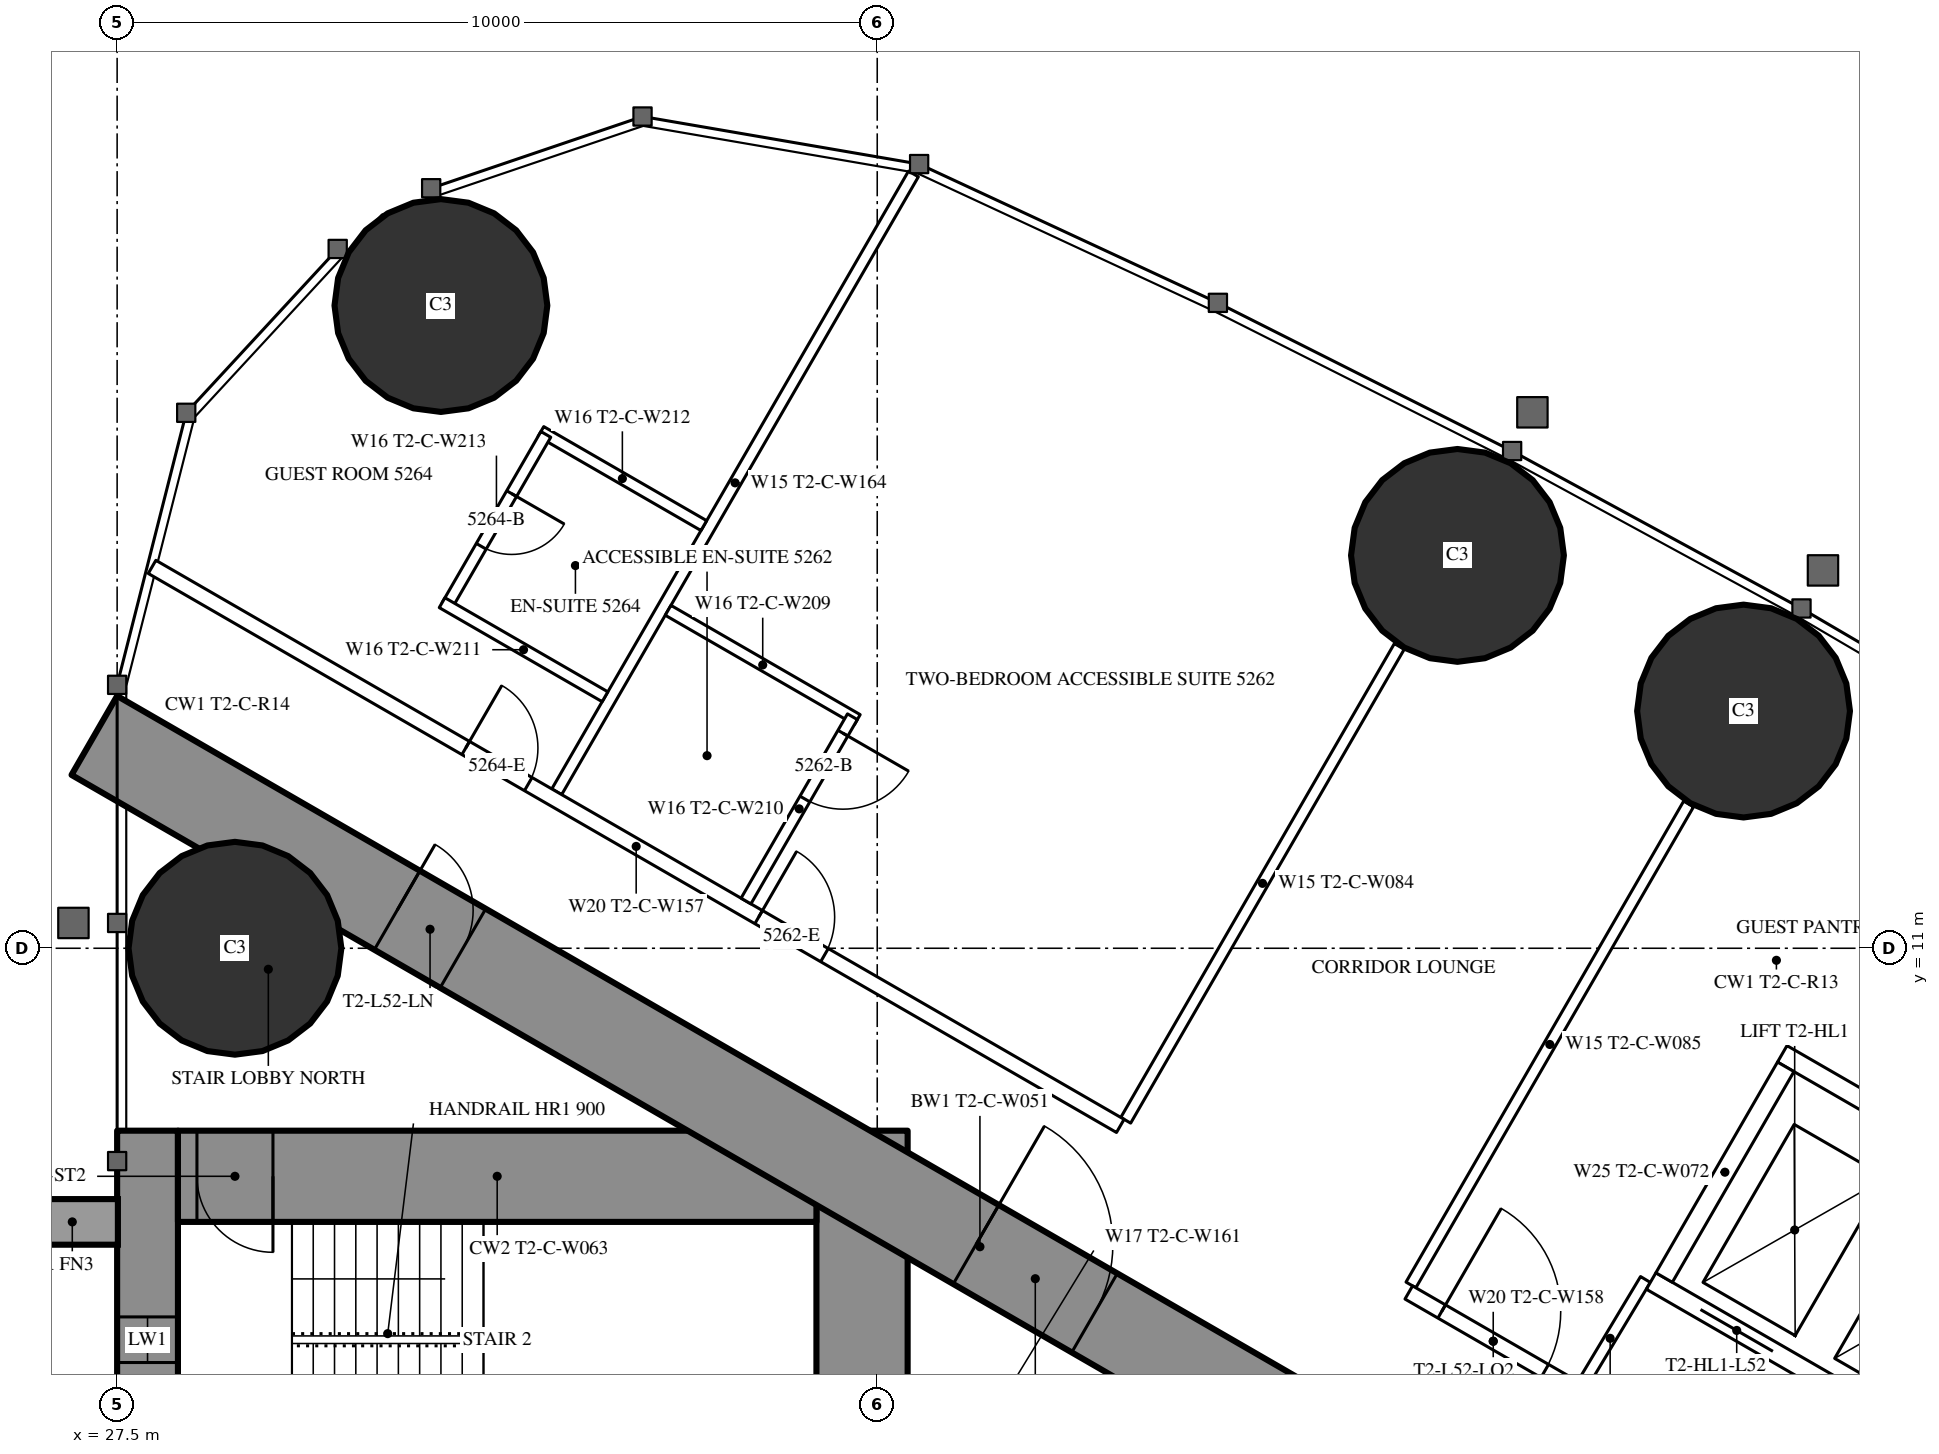
"""IFC4 building model, lengths in metres.
Left out: names, types, materials, properties, quantities, classifications, styles, units other than length and angle.
Written with IfcOpenShell. Run it as: python <this file> out.ifc"""

import sys

from ifc_helpers import new_model, si_unit, direction, frame, frame_2d, origin, origin_2d, place, context, subcontext, project, spatial, rectangle, circle, extrude, element, fill, save


model = new_model("IFC4")
c1 = context("Model", 3, precision=1e-05, world=origin(), true_north=direction((0.0, 1.0)))
c2 = subcontext(c1, "Body", "Model", "MODEL_VIEW")
j1 = project(units=[si_unit("LENGTHUNIT", "METRE"), si_unit("PLANEANGLEUNIT", "RADIAN")], contexts=[c1])
p1 = place(None, origin())
s1 = spatial("IfcSite", under=j1, at=p1, CompositionType="ELEMENT")
p2 = place(p1, origin())
s2 = spatial("IfcBuilding", under=s1, at=p2, CompositionType="ELEMENT")
p3 = place(p2, frame((0.0, 0.0, 194.8)))
s3 = spatial("IfcBuildingStorey", under=s2, at=p3, CompositionType="ELEMENT", Elevation=194.8)
for number, where, z_axis, x_axis in (
    (1, (31.76, 19.456, 0.0), (0.0, 0.0, 1.0), (1.0, 0.0, 0.0)),
    (2, (29.05, 11.0, 0.0), (0.0, 0.0, 1.0), (1.0, 0.0, 0.0)),
    (3, (48.897, 14.121, 0.0), (0.0, 0.0, 1.0), (1.0, 0.0, 0.0)),
    (4, (45.134, 16.168, 0.0), (0.0, 0.0, 1.0), (1.0, 0.0, 0.0)),
):
    element("IfcColumn", number, at=place(p3, frame(where, z_axis=z_axis, x_axis=x_axis)), inside=s3, PredefinedType="COLUMN", context=c2, shape_type="SweptSolid", body=[
        extrude(circle(Radius=1.4, at=origin_2d()), origin(), (0.0, 0.0, 1.0), 3.5),
    ])
p4 = place(p3, frame((27.9, -8.6, 0.0), z_axis=(0.0, 0.0, 1.0), x_axis=(0.0, 1.0, 0.0)))
e5 = element("IfcWall", 5, at=p4, inside=s3, PredefinedType="SHEAR", context=c2, shape_type="SweptSolid", body=[
    extrude(rectangle(XDim=17.2, YDim=0.8, at=frame_2d((8.6, 0.0))), origin(), (0.0, 0.0, 1.0), 3.5),
])
p5 = place(p4, frame((2.45, 0.0, 0.6)))
e6 = element("IfcOpeningElement", 6, at=p5, cuts=e5, PredefinedType="OPENING", context=c2, shape_type="SweptSolid", body=[
    extrude(rectangle(XDim=0.6, YDim=2.1, at=frame_2d((0.3, 1.05))), frame((0.0, 0.41, 0.0), z_axis=(0.0, -1.0, 0.0), x_axis=(1.0, 0.0, 0.0)), (0.0, 0.0, 1.0), 0.82),
])
p6 = place(p4, frame((14.15, 0.0, 0.6)))
e7 = element("IfcOpeningElement", 7, at=p6, cuts=e5, PredefinedType="OPENING", context=c2, shape_type="SweptSolid", body=[
    extrude(rectangle(XDim=0.6, YDim=2.1, at=frame_2d((0.3, 1.05))), frame((0.0, 0.41, 0.0), z_axis=(0.0, -1.0, 0.0), x_axis=(1.0, 0.0, 0.0)), (0.0, 0.0, 1.0), 0.82),
])
p7 = place(p3, frame((37.3, -8.6, 0.0), z_axis=(0.0, 0.0, 1.0), x_axis=(0.0, 1.0, 0.0)))
e8 = element("IfcWall", 8, at=p7, inside=s3, PredefinedType="SHEAR", context=c2, shape_type="SweptSolid", body=[
    extrude(rectangle(XDim=17.2, YDim=1.2, at=frame_2d((8.6, 0.0))), origin(), (0.0, 0.0, 1.0), 3.5),
])
p8 = place(p7, frame((7.7, 0.0, 0.0)))
e9 = element("IfcOpeningElement", 9, at=p8, cuts=e8, PredefinedType="OPENING", context=c2, shape_type="SweptSolid", body=[
    extrude(rectangle(XDim=1.8, YDim=2.2, at=frame_2d((0.9, 1.1))), frame((0.0, 0.61, 0.0), z_axis=(0.0, -1.0, 0.0), x_axis=(1.0, 0.0, 0.0)), (0.0, 0.0, 1.0), 1.22),
])
p9 = place(p3, frame((28.3, 8.0, 0.0), z_axis=(0.0, 0.0, 1.0), x_axis=(1.0, 0.0, 0.0)))
e10 = element("IfcWall", 10, at=p9, inside=s3, PredefinedType="SHEAR", context=c2, shape_type="SweptSolid", body=[
    extrude(rectangle(XDim=8.4, YDim=1.2, at=frame_2d((4.2, 0.0))), origin(), (0.0, 0.0, 1.0), 3.5),
])
p10 = place(p9, frame((0.25, 0.0, 0.0)))
e11 = element("IfcOpeningElement", 11, at=p10, cuts=e10, PredefinedType="OPENING", context=c2, shape_type="SweptSolid", body=[
    extrude(rectangle(XDim=1.0, YDim=2.2, at=frame_2d((0.5, 1.1))), frame((0.0, 0.61, 0.0), z_axis=(0.0, -1.0, 0.0), x_axis=(1.0, 0.0, 0.0)), (0.0, 0.0, 1.0), 1.22),
])
p11 = place(p3, frame((27.2, 13.8, 0.0), z_axis=(0.0, 0.0, 1.0), x_axis=(0.866024515034, -0.500001539357, 0.0)))
e12 = element("IfcWall", 12, at=p11, inside=s3, PredefinedType="SHEAR", context=c2, shape_type="SweptSolid", body=[
    extrude(rectangle(XDim=26.907, YDim=1.2, at=frame_2d((13.454, 0.0))), origin(), (0.0, 0.0, 1.0), 3.5),
])
p12 = place(p11, frame((4.6, 0.0, 0.0)))
e13 = element("IfcOpeningElement", 13, at=p12, cuts=e12, PredefinedType="OPENING", context=c2, shape_type="SweptSolid", body=[
    extrude(rectangle(XDim=1.0, YDim=2.2, at=frame_2d((0.5, 1.1))), frame((0.0, 0.61, 0.0), z_axis=(0.0, -1.0, 0.0), x_axis=(1.0, 0.0, 0.0)), (0.0, 0.0, 1.0), 1.22),
])
p13 = place(p11, frame((13.395, 0.0, 0.0)))
e14 = element("IfcOpeningElement", 14, at=p13, cuts=e12, PredefinedType="OPENING", context=c2, shape_type="SweptSolid", body=[
    extrude(rectangle(XDim=1.8, YDim=2.2, at=frame_2d((0.9, 1.1))), frame((0.0, 0.61, 0.0), z_axis=(0.0, -1.0, 0.0), x_axis=(1.0, 0.0, 0.0)), (0.0, 0.0, 1.0), 1.22),
])
p14 = place(p3, frame((33.284, 13.059, 0.0), z_axis=(0.0, 0.0, 1.0), x_axis=(0.499985904184, 0.866033541855, 0.0)))
e15 = element("IfcWall", 15, at=p14, inside=s3, PredefinedType="PARTITIONING", context=c2, shape_type="SweptSolid", body=[
    extrude(rectangle(XDim=9.385, YDim=0.15, at=frame_2d((4.693, 0.0))), origin(), (0.0, 0.0, 1.0), 3.25),
])
p15 = place(p3, frame((40.769, 8.737, 0.0), z_axis=(0.0, 0.0, 1.0), x_axis=(0.500013115284, 0.866017831539, 0.0)))
e16 = element("IfcWall", 16, at=p15, inside=s3, PredefinedType="PARTITIONING", context=c2, shape_type="SweptSolid", body=[
    extrude(rectangle(XDim=7.198, YDim=0.15, at=frame_2d((3.599, 0.0))), origin(), (0.0, 0.0, 1.0), 2.3),
])
p16 = place(p3, frame((44.521, 6.571, 0.0), z_axis=(0.0, 0.0, 1.0), x_axis=(0.500020376429, 0.866013639128, 0.0)))
e17 = element("IfcWall", 17, at=p16, inside=s3, PredefinedType="PARTITIONING", context=c2, shape_type="SweptSolid", body=[
    extrude(rectangle(XDim=7.306, YDim=0.15, at=frame_2d((3.653, 0.0))), origin(), (0.0, 0.0, 1.0), 2.3),
])
p17 = place(p3, frame((47.606, 6.643, 0.0), z_axis=(0.0, 0.0, 1.0), x_axis=(-0.514237157483, -0.857648031458, 0.0)))
e18 = element("IfcWall", 18, at=p17, inside=s3, PredefinedType="PARTITIONING", context=c2, shape_type="SweptSolid", body=[
    extrude(rectangle(XDim=1.805, YDim=0.15, at=frame_2d((0.902, 0.0))), origin(), (0.0, 0.0, 1.0), 3.25),
])
p18 = place(p3, frame((27.959, 16.017, 0.0), z_axis=(0.0, 0.0, 1.0), x_axis=(0.866024165033, -0.500002145574, 0.0)))
e19 = element("IfcWall", 19, at=p18, inside=s3, PredefinedType="PARTITIONING", context=c2, shape_type="SweptSolid", body=[
    extrude(rectangle(XDim=14.709, YDim=0.2, at=frame_2d((7.354, 0.0))), origin(), (0.0, 0.0, 1.0), 3.25),
])
p19 = place(p18, frame((9.215, 0.0, 0.0)))
e20 = element("IfcOpeningElement", 20, at=p19, cuts=e19, PredefinedType="OPENING", context=c2, shape_type="SweptSolid", body=[
    extrude(rectangle(XDim=1.0, YDim=2.2, at=frame_2d((0.5, 1.1))), frame((0.0, 0.11, 0.0), z_axis=(0.0, -1.0, 0.0), x_axis=(1.0, 0.0, 0.0)), (0.0, 0.0, 1.0), 0.22),
])
p20 = place(p18, frame((4.765, 0.0, 0.0)))
e21 = element("IfcOpeningElement", 21, at=p20, cuts=e19, PredefinedType="OPENING", context=c2, shape_type="SweptSolid", body=[
    extrude(rectangle(XDim=0.95, YDim=2.2, at=frame_2d((0.475, 1.1))), frame((0.0, 0.11, 0.0), z_axis=(0.0, -1.0, 0.0), x_axis=(1.0, 0.0, 0.0)), (0.0, 0.0, 1.0), 0.22),
])
p21 = place(p3, frame((44.493, 6.472, 0.0), z_axis=(0.0, 0.0, 1.0), x_axis=(0.866027140358, -0.499996992154, 0.0)))
e22 = element("IfcWall", 22, at=p21, inside=s3, PredefinedType="PARTITIONING", context=c2, shape_type="SweptSolid", body=[
    extrude(rectangle(XDim=2.566, YDim=0.2, at=frame_2d((1.283, 0.0))), origin(), (0.0, 0.0, 1.0), 3.25),
])
p22 = place(p21, frame((0.5, 0.0, 0.0)))
e23 = element("IfcOpeningElement", 23, at=p22, cuts=e22, PredefinedType="OPENING", context=c2, shape_type="SweptSolid", body=[
    extrude(rectangle(XDim=1.566, YDim=2.2, at=frame_2d((0.783, 1.1))), frame((0.0, 0.11, 0.0), z_axis=(0.0, -1.0, 0.0), x_axis=(1.0, 0.0, 0.0)), (0.0, 0.0, 1.0), 0.22),
])
p23 = place(p3, frame((34.749, 15.446, 0.0), z_axis=(0.0, 0.0, 1.0), x_axis=(0.866018712932, -0.500011588718, 0.0)))
e24 = element("IfcWall", 24, at=p23, inside=s3, PredefinedType="PARTITIONING", context=c2, shape_type="SweptSolid", body=[
    extrude(rectangle(XDim=2.875, YDim=0.15, at=frame_2d((1.438, 0.0))), origin(), (0.0, 0.0, 1.0), 3.25),
])
p24 = place(p3, frame((35.773, 11.621, 0.0), z_axis=(0.0, 0.0, 1.0), x_axis=(0.49998411664, 0.866034573852, 0.0)))
e25 = element("IfcWall", 25, at=p24, inside=s3, PredefinedType="PARTITIONING", context=c2, shape_type="SweptSolid", body=[
    extrude(rectangle(XDim=2.8, YDim=0.15, at=frame_2d((1.4, 0.0))), origin(), (0.0, 0.0, 1.0), 3.25),
])
p25 = place(p24, frame((1.55, 0.0, 0.0)))
e26 = element("IfcOpeningElement", 26, at=p25, cuts=e25, PredefinedType="OPENING", context=c2, shape_type="SweptSolid", body=[
    extrude(rectangle(XDim=1.0, YDim=2.2, at=frame_2d((0.5, 1.1))), frame((0.0, 0.085, 0.0), z_axis=(0.0, -1.0, 0.0), x_axis=(1.0, 0.0, 0.0)), (0.0, 0.0, 1.0), 0.17),
])
p26 = place(p3, frame((33.075, 17.798, 0.0), z_axis=(0.0, 0.0, 1.0), x_axis=(0.866006523861, -0.500032699561, 0.0)))
e27 = element("IfcWall", 27, at=p26, inside=s3, PredefinedType="PARTITIONING", context=c2, shape_type="SweptSolid", body=[
    extrude(rectangle(XDim=2.475, YDim=0.15, at=frame_2d((1.237, 0.0))), origin(), (0.0, 0.0, 1.0), 3.25),
])
p27 = place(p3, frame((31.84, 15.509, 0.0), z_axis=(0.0, 0.0, 1.0), x_axis=(0.500006934395, 0.866021400173, 0.0)))
e28 = element("IfcWall", 28, at=p27, inside=s3, PredefinedType="PARTITIONING", context=c2, shape_type="SweptSolid", body=[
    extrude(rectangle(XDim=2.6, YDim=0.15, at=frame_2d((1.3, 0.0))), origin(), (0.0, 0.0, 1.0), 3.25),
])
p28 = place(p27, frame((0.9, 0.0, 0.0)))
e29 = element("IfcOpeningElement", 29, at=p28, cuts=e28, PredefinedType="OPENING", context=c2, shape_type="SweptSolid", body=[
    extrude(rectangle(XDim=0.8, YDim=2.2, at=frame_2d((0.4, 1.1))), frame((0.0, 0.085, 0.0), z_axis=(0.0, -1.0, 0.0), x_axis=(1.0, 0.0, 0.0)), (0.0, 0.0, 1.0), 0.17),
])
p29 = place(p3, frame((31.775, 15.546, 0.0), z_axis=(0.0, 0.0, 1.0), x_axis=(0.866031185235, -0.4999899861, 0.0)))
e30 = element("IfcWall", 30, at=p29, inside=s3, PredefinedType="PARTITIONING", context=c2, shape_type="SweptSolid", body=[
    extrude(rectangle(XDim=2.475, YDim=0.15, at=frame_2d((1.238, 0.0))), origin(), (0.0, 0.0, 1.0), 3.25),
])
p30 = place(p3, frame((47.681, 6.622, 0.0), z_axis=(0.0, 0.0, 1.0), x_axis=(0.86603344179, -0.499986077507, 0.0)))
e31 = element("IfcWall", 31, at=p30, inside=s3, PredefinedType="PARTITIONING", context=c2, shape_type="SweptSolid", body=[
    extrude(rectangle(XDim=6.6, YDim=0.25, at=frame_2d((3.3, 0.0))), origin(), (0.0, 0.0, 1.0), 3.25),
])
p31 = place(p30, frame((0.75, 0.0, 0.0)))
e32 = element("IfcOpeningElement", 32, at=p31, cuts=e31, PredefinedType="OPENING", context=c2, shape_type="SweptSolid", body=[
    extrude(rectangle(XDim=1.1, YDim=2.2, at=frame_2d((0.55, 1.1))), frame((0.0, 0.135, 0.0), z_axis=(0.0, -1.0, 0.0), x_axis=(1.0, 0.0, 0.0)), (0.0, 0.0, 1.0), 0.27),
])
p32 = place(p30, frame((2.75, 0.0, 0.0)))
e33 = element("IfcOpeningElement", 33, at=p32, cuts=e31, PredefinedType="OPENING", context=c2, shape_type="SweptSolid", body=[
    extrude(rectangle(XDim=1.1, YDim=2.2, at=frame_2d((0.55, 1.1))), frame((0.0, 0.135, 0.0), z_axis=(0.0, -1.0, 0.0), x_axis=(1.0, 0.0, 0.0)), (0.0, 0.0, 1.0), 0.27),
])
p33 = place(p30, frame((4.75, 0.0, 0.0)))
e34 = element("IfcOpeningElement", 34, at=p33, cuts=e31, PredefinedType="OPENING", context=c2, shape_type="SweptSolid", body=[
    extrude(rectangle(XDim=1.1, YDim=2.2, at=frame_2d((0.55, 1.1))), frame((0.0, 0.135, 0.0), z_axis=(0.0, -1.0, 0.0), x_axis=(1.0, 0.0, 0.0)), (0.0, 0.0, 1.0), 0.27),
])
p34 = place(p3, frame((49.406, 9.611, 0.0), z_axis=(0.0, 0.0, 1.0), x_axis=(0.86603344179, -0.499986077507, 0.0)))
e35 = element("IfcWall", 35, at=p34, inside=s3, PredefinedType="PARTITIONING", context=c2, shape_type="SweptSolid", body=[
    extrude(rectangle(XDim=6.6, YDim=0.25, at=frame_2d((3.3, 0.0))), origin(), (0.0, 0.0, 1.0), 3.25),
])
p35 = place(p3, frame((47.852, 6.668, 0.0), z_axis=(0.0, 0.0, 1.0), x_axis=(0.499929347863, 0.866066190972, 0.0)))
e36 = element("IfcWall", 36, at=p35, inside=s3, PredefinedType="PARTITIONING", context=c2, shape_type="SweptSolid", body=[
    extrude(rectangle(XDim=3.201, YDim=0.25, at=frame_2d((1.6, 0.0))), origin(), (0.0, 0.0, 1.0), 3.25),
])
p36 = place(p25, origin())
e37 = element("IfcDoor", 37, at=p36, inside=s3, OperationType="SINGLE_SWING_RIGHT", PredefinedType="DOOR", context=c2, shape_type="SweptSolid", body=[
    extrude(rectangle(XDim=1.0, YDim=2.2, at=frame_2d((0.5, 1.1))), frame((0.0, 0.025, 0.0), z_axis=(0.0, -1.0, 0.0), x_axis=(1.0, 0.0, 0.0)), (0.0, 0.0, 1.0), 0.05),
])
fill(e26, e37)
p37 = place(p19, origin())
e38 = element("IfcDoor", 38, at=p37, inside=s3, OperationType="SINGLE_SWING_LEFT", PredefinedType="DOOR", context=c2, shape_type="SweptSolid", body=[
    extrude(rectangle(XDim=1.0, YDim=2.2, at=frame_2d((0.5, 1.1))), frame((0.0, 0.025, 0.0), z_axis=(0.0, -1.0, 0.0), x_axis=(1.0, 0.0, 0.0)), (0.0, 0.0, 1.0), 0.05),
])
fill(e20, e38)
p38 = place(p28, origin())
e39 = element("IfcDoor", 39, at=p38, inside=s3, OperationType="SINGLE_SWING_RIGHT", PredefinedType="DOOR", context=c2, shape_type="SweptSolid", body=[
    extrude(rectangle(XDim=0.8, YDim=2.2, at=frame_2d((0.4, 1.1))), frame((0.0, 0.025, 0.0), z_axis=(0.0, -1.0, 0.0), x_axis=(1.0, 0.0, 0.0)), (0.0, 0.0, 1.0), 0.05),
])
fill(e29, e39)
p39 = place(p20, origin())
e40 = element("IfcDoor", 40, at=p39, inside=s3, OperationType="SINGLE_SWING_LEFT", PredefinedType="DOOR", context=c2, shape_type="SweptSolid", body=[
    extrude(rectangle(XDim=0.95, YDim=2.2, at=frame_2d((0.475, 1.1))), frame((0.0, 0.025, 0.0), z_axis=(0.0, -1.0, 0.0), x_axis=(1.0, 0.0, 0.0)), (0.0, 0.0, 1.0), 0.05),
])
fill(e21, e40)
p40 = place(p22, origin())
e41 = element("IfcDoor", 41, at=p40, inside=s3, OperationType="SINGLE_SWING_LEFT", PredefinedType="DOOR", context=c2, shape_type="SweptSolid", body=[
    extrude(rectangle(XDim=1.566, YDim=2.2, at=frame_2d((0.783, 1.1))), frame((0.0, 0.025, 0.0), z_axis=(0.0, -1.0, 0.0), x_axis=(1.0, 0.0, 0.0)), (0.0, 0.0, 1.0), 0.05),
])
fill(e23, e41)
p41 = place(p12, origin())
e42 = element("IfcDoor", 42, at=p41, inside=s3, OperationType="SINGLE_SWING_LEFT", PredefinedType="DOOR", context=c2, shape_type="SweptSolid", body=[
    extrude(rectangle(XDim=1.0, YDim=2.2, at=frame_2d((0.5, 1.1))), frame((0.0, 0.025, 0.0), z_axis=(0.0, -1.0, 0.0), x_axis=(1.0, 0.0, 0.0)), (0.0, 0.0, 1.0), 0.05),
])
fill(e13, e42)
p42 = place(p13, origin())
e43 = element("IfcDoor", 43, at=p42, inside=s3, OperationType="DOUBLE_DOOR_SINGLE_SWING", PredefinedType="DOOR", context=c2, shape_type="SweptSolid", body=[
    extrude(rectangle(XDim=1.8, YDim=2.2, at=frame_2d((0.9, 1.1))), frame((0.0, 0.025, 0.0), z_axis=(0.0, -1.0, 0.0), x_axis=(1.0, 0.0, 0.0)), (0.0, 0.0, 1.0), 0.05),
])
fill(e14, e43)
p43 = place(p10, origin())
e44 = element("IfcDoor", 44, at=p43, inside=s3, OperationType="SINGLE_SWING_RIGHT", PredefinedType="DOOR", context=c2, shape_type="SweptSolid", body=[
    extrude(rectangle(XDim=1.0, YDim=2.2, at=frame_2d((0.5, 1.1))), frame((0.0, 0.025, 0.0), z_axis=(0.0, -1.0, 0.0), x_axis=(1.0, 0.0, 0.0)), (0.0, 0.0, 1.0), 0.05),
])
fill(e11, e44)
p44 = place(p31, origin())
e45 = element("IfcDoor", 45, at=p44, inside=s3, OperationType="DOUBLE_DOOR_SLIDING", PredefinedType="USERDEFINED", context=c2, shape_type="SweptSolid", body=[
    extrude(rectangle(XDim=1.1, YDim=2.2, at=frame_2d((0.55, 1.1))), frame((0.0, 0.025, 0.0), z_axis=(0.0, -1.0, 0.0), x_axis=(1.0, 0.0, 0.0)), (0.0, 0.0, 1.0), 0.05),
])
fill(e32, e45)
p45 = place(p6, origin())
e46 = element("IfcWindow", 46, at=p45, inside=s3, PartitioningType="SINGLE_PANEL", PredefinedType="WINDOW", context=c2, shape_type="SweptSolid", body=[
    extrude(rectangle(XDim=0.6, YDim=2.1, at=frame_2d((0.3, 1.05))), frame((0.0, 0.03, 0.0), z_axis=(0.0, -1.0, 0.0), x_axis=(1.0, 0.0, 0.0)), (0.0, 0.0, 1.0), 0.06),
])
fill(e7, e46)
save(model, sys.argv[1])
